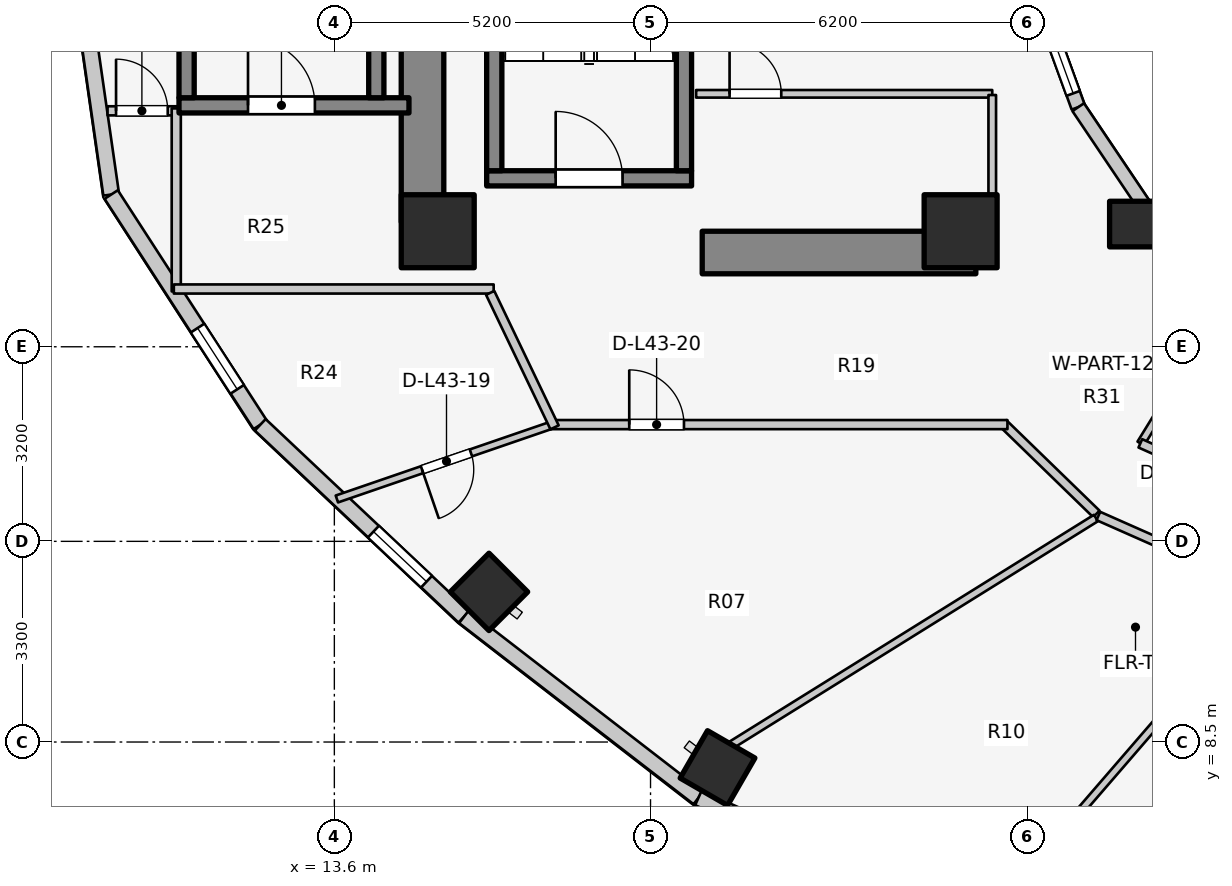
"""IFC4 building model, lengths in metres.
Left out: names, types, materials, properties, quantities, classifications, styles, units other than length and angle.
Written with IfcOpenShell. Run it as: python <this file> out.ifc"""

import sys

from ifc_helpers import new_model, si_unit, direction, frame, frame_2d, origin, origin_2d, place, context, subcontext, project, spatial, rectangle, extrude, element, fill, save


model = new_model("IFC4")
c1 = context("Model", 3, precision=1e-05, world=origin(), true_north=direction((0.0, 1.0)))
c2 = subcontext(c1, "Body", "Model", "MODEL_VIEW")
j1 = project(units=[si_unit("LENGTHUNIT", "METRE"), si_unit("PLANEANGLEUNIT", "RADIAN")], contexts=[c1])
p1 = place(None, origin())
s1 = spatial("IfcSite", under=j1, at=p1, CompositionType="ELEMENT")
p2 = place(p1, origin())
s2 = spatial("IfcBuilding", under=s1, at=p2, CompositionType="ELEMENT")
p3 = place(p2, frame((0.0, 0.0, 143.6)))
s3 = spatial("IfcBuildingStorey", under=s2, at=p3, CompositionType="ELEMENT", Elevation=143.6)
p4 = place(p3, frame((15.05, 17.05, 0.0), z_axis=(0.0, 0.0, 1.0), x_axis=(0.0, 1.0, 0.0)))
e1 = element("IfcWall", 1, at=p4, inside=s3, PredefinedType="SHEAR", context=c2, shape_type="SweptSolid", body=[
    extrude(rectangle(XDim=12.8, YDim=0.7, at=frame_2d((6.4, 0.0))), origin(), (0.0, 0.0, 1.0), 3.1),
])
p5 = place(p3, frame((19.65, 16.55, 0.0), z_axis=(0.0, 0.0, 1.0), x_axis=(1.0, 0.0, 0.0)))
e2 = element("IfcWall", 2, at=p5, inside=s3, PredefinedType="SHEAR", context=c2, shape_type="SweptSolid", body=[
    extrude(rectangle(XDim=4.5, YDim=0.7, at=frame_2d((2.25, 0.0))), origin(), (0.0, 0.0, 1.0), 3.1),
])
p6 = place(p3, frame((16.105, 17.77, 0.0), z_axis=(0.0, 0.0, 1.0), x_axis=(1.0, 0.0, 0.0)))
e3 = element("IfcWall", 3, at=p6, inside=s3, PredefinedType="SOLIDWALL", context=c2, shape_type="SweptSolid", body=[
    extrude(rectangle(XDim=3.37, YDim=0.25, at=frame_2d((1.685, 0.0))), origin(), (0.0, 0.0, 1.0), 3.1),
])
p7 = place(p6, frame((1.135, 0.0, 0.0)))
e4 = element("IfcOpeningElement", 4, at=p7, cuts=e3, PredefinedType="OPENING", context=c2, shape_type="SweptSolid", body=[
    extrude(rectangle(XDim=1.1, YDim=2.1, at=frame_2d((0.55, 1.05))), frame((0.0, 0.135, 0.0), z_axis=(0.0, -1.0, 0.0), x_axis=(1.0, 0.0, 0.0)), (0.0, 0.0, 1.0), 0.27),
])
for number, where, z_axis, x_axis in (
    (5, (16.23, 17.895, 0.0), (0.0, 0.0, 1.0), (0.0, 1.0, 0.0)),
    (6, (19.35, 17.895, 0.0), (0.0, 0.0, 1.0), (0.0, 1.0, 0.0)),
):
    element("IfcWall", number, at=place(p3, frame(where, z_axis=z_axis, x_axis=x_axis)), inside=s3, PredefinedType="SOLIDWALL", context=c2, shape_type="SweptSolid", body=[
        extrude(rectangle(XDim=7.81, YDim=0.25, at=frame_2d((3.905, 0.0))), origin(), (0.0, 0.0, 1.0), 3.1),
    ])
p8 = place(p3, frame((11.045, 18.97, 0.0), z_axis=(0.0, 0.0, 1.0), x_axis=(1.0, 0.0, 0.0)))
e7 = element("IfcWall", 7, at=p8, inside=s3, PredefinedType="SOLIDWALL", context=c2, shape_type="SweptSolid", body=[
    extrude(rectangle(XDim=3.782, YDim=0.25, at=frame_2d((1.891, 0.0))), origin(), (0.0, 0.0, 1.0), 3.1),
])
p9 = place(p8, frame((1.135, 0.0, 0.0)))
e8 = element("IfcOpeningElement", 8, at=p9, cuts=e7, PredefinedType="OPENING", context=c2, shape_type="SweptSolid", body=[
    extrude(rectangle(XDim=1.1, YDim=2.1, at=frame_2d((0.55, 1.05))), frame((0.0, 0.135, 0.0), z_axis=(0.0, -1.0, 0.0), x_axis=(1.0, 0.0, 0.0)), (0.0, 0.0, 1.0), 0.27),
])
for number, where, z_axis, x_axis in (
    (9, (11.17, 19.095, 0.0), (0.0, 0.0, 1.0), (0.0, 1.0, 0.0)),
    (10, (14.29, 19.095, 0.0), (0.0, 0.0, 1.0), (0.0, 1.0, 0.0)),
):
    element("IfcWall", number, at=place(p3, frame(where, z_axis=z_axis, x_axis=x_axis)), inside=s3, PredefinedType="SOLIDWALL", context=c2, shape_type="SweptSolid", body=[
        extrude(rectangle(XDim=7.81, YDim=0.25, at=frame_2d((3.905, 0.0))), origin(), (0.0, 0.0, 1.0), 3.1),
    ])
for number, where, z_axis, x_axis in (
    (11, (15.3, 16.9, 0.0), (0.0, 0.0, 1.0), (1.0, 0.0, 0.0)),
    (12, (23.9, 16.9, 0.0), (0.0, 0.0, 1.0), (1.0, 0.0, 0.0)),
):
    element("IfcColumn", number, at=place(p3, frame(where, z_axis=z_axis, x_axis=x_axis)), inside=s3, PredefinedType="COLUMN", context=c2, shape_type="SweptSolid", body=[
        extrude(rectangle(XDim=1.2, YDim=1.2, at=origin_2d()), origin(), (0.0, 0.0, 1.0), 3.1),
    ])
p10 = place(p3, frame((26.725, 17.018, 0.0), z_axis=(0.0, 0.0, 1.0), x_axis=(1.0, 0.0, 0.0)))
e13 = element("IfcColumn", 13, at=p10, inside=s3, PredefinedType="COLUMN", context=c2, shape_type="SweptSolid", body=[
    extrude(rectangle(XDim=0.75, YDim=0.75, at=origin_2d()), origin(), (0.0, 0.0, 1.0), 3.1),
])
for number, where, z_axis, x_axis in (
    (14, (16.143, 10.969, 0.0), (0.0, 0.0, 1.0), (-0.707, -0.707, 0.0)),
    (15, (19.902, 8.072, 0.0), (0.0, 0.0, 1.0), (-0.5, -0.866, 0.0)),
):
    element("IfcColumn", number, at=place(p3, frame(where, z_axis=z_axis, x_axis=x_axis)), inside=s3, PredefinedType="COLUMN", context=c2, shape_type="SweptSolid", body=[
        extrude(rectangle(XDim=0.9, YDim=0.9, at=origin_2d()), origin(), (0.0, 0.0, 1.0), 3.1),
    ])
p11 = place(p3, frame((25.123, 20.898, 0.0), z_axis=(0.0, 0.0, 1.0), x_axis=(0.341423187295, -0.93990968033, 0.0)))
e16 = element("IfcWall", 16, at=p11, inside=s3, PredefinedType="STANDARD", context=c2, shape_type="SweptSolid", body=[
    extrude(rectangle(XDim=2.084, YDim=0.23, at=frame_2d((1.042, 0.0))), origin(), (0.0, 0.0, 1.0), 2.84),
])
p12 = place(p11, frame((0.242, 0.0, 0.85)))
e17 = element("IfcOpeningElement", 17, at=p12, cuts=e16, PredefinedType="OPENING", context=c2, shape_type="SweptSolid", body=[
    extrude(rectangle(XDim=1.6, YDim=1.65, at=frame_2d((0.8, 0.825))), frame((0.0, 0.125, 0.0), z_axis=(0.0, -1.0, 0.0), x_axis=(1.0, 0.0, 0.0)), (0.0, 0.0, 1.0), 0.25),
])
p13 = place(p3, frame((25.834, 18.94, 0.0), z_axis=(0.0, 0.0, 1.0), x_axis=(0.558197800898, -0.829707909492, 0.0)))
e18 = element("IfcWall", 18, at=p13, inside=s3, PredefinedType="STANDARD", context=c2, shape_type="SweptSolid", body=[
    extrude(rectangle(XDim=2.027, YDim=0.23, at=frame_2d((1.013, 0.0))), origin(), (0.0, 0.0, 1.0), 2.16),
])
p14 = place(p3, frame((26.965, 17.258, 0.0), z_axis=(0.0, 0.0, 1.0), x_axis=(0.752576694707, -0.658504607869, 0.0)))
e19 = element("IfcWall", 19, at=p14, inside=s3, PredefinedType="STANDARD", context=c2, shape_type="SweptSolid", body=[
    extrude(rectangle(XDim=1.959, YDim=0.23, at=frame_2d((0.98, 0.0))), origin(), (0.0, 0.0, 1.0), 2.16),
])
p15 = place(p3, frame((9.14, 23.0, 0.0), z_axis=(0.0, 0.0, 1.0), x_axis=(0.142227632286, -0.989833976288, 0.0)))
e20 = element("IfcWall", 20, at=p15, inside=s3, PredefinedType="STANDARD", context=c2, shape_type="SweptSolid", body=[
    extrude(rectangle(XDim=5.553, YDim=0.26, at=frame_2d((2.776, 0.0))), origin(), (0.0, 0.0, 1.0), 2.85),
])
p16 = place(p15, frame((1.506, 0.0, 0.75)))
e21 = element("IfcOpeningElement", 21, at=p16, cuts=e20, PredefinedType="OPENING", context=c2, shape_type="SweptSolid", body=[
    extrude(rectangle(XDim=1.2, YDim=1.5, at=frame_2d((0.6, 0.75))), frame((0.0, 0.14, 0.0), z_axis=(0.0, -1.0, 0.0), x_axis=(1.0, 0.0, 0.0)), (0.0, 0.0, 1.0), 0.28),
])
p17 = place(p3, frame((9.93, 17.503, 0.0), z_axis=(0.0, 0.0, 1.0), x_axis=(0.543358984534, -0.839500454989, 0.0)))
e22 = element("IfcWall", 22, at=p17, inside=s3, PredefinedType="STANDARD", context=c2, shape_type="SweptSolid", body=[
    extrude(rectangle(XDim=4.511, YDim=0.26, at=frame_2d((2.256, 0.0))), origin(), (0.0, 0.0, 1.0), 2.85),
])
p18 = place(p17, frame((2.615, 0.0, 0.75)))
e23 = element("IfcOpeningElement", 23, at=p18, cuts=e22, PredefinedType="OPENING", context=c2, shape_type="SweptSolid", body=[
    extrude(rectangle(XDim=1.2, YDim=1.5, at=frame_2d((0.6, 0.75))), frame((0.0, 0.14, 0.0), z_axis=(0.0, -1.0, 0.0), x_axis=(1.0, 0.0, 0.0)), (0.0, 0.0, 1.0), 0.28),
])
p19 = place(p3, frame((12.381, 13.716, 0.0), z_axis=(0.0, 0.0, 1.0), x_axis=(0.727667301037, -0.68593024354, 0.0)))
e24 = element("IfcWall", 24, at=p19, inside=s3, PredefinedType="STANDARD", context=c2, shape_type="SweptSolid", body=[
    extrude(rectangle(XDim=4.604, YDim=0.26, at=frame_2d((2.302, 0.0))), origin(), (0.0, 0.0, 1.0), 2.85),
])
p20 = place(p19, frame((2.56, 0.0, 0.75)))
e25 = element("IfcOpeningElement", 25, at=p20, cuts=e24, PredefinedType="OPENING", context=c2, shape_type="SweptSolid", body=[
    extrude(rectangle(XDim=1.2, YDim=1.5, at=frame_2d((0.6, 0.75))), frame((0.0, 0.14, 0.0), z_axis=(0.0, -1.0, 0.0), x_axis=(1.0, 0.0, 0.0)), (0.0, 0.0, 1.0), 0.28),
])
p21 = place(p3, frame((15.731, 10.559, 0.0), z_axis=(0.0, 0.0, 1.0), x_axis=(0.791460185804, -0.611220724687, 0.0)))
e26 = element("IfcWall", 26, at=p21, inside=s3, PredefinedType="STANDARD", context=c2, shape_type="SweptSolid", body=[
    extrude(rectangle(XDim=4.872, YDim=0.26, at=frame_2d((2.436, 0.0))), origin(), (0.0, 0.0, 1.0), 2.85),
])
p22 = place(p3, frame((19.587, 7.581, 0.0), z_axis=(0.0, 0.0, 1.0), x_axis=(0.912353637112, -0.409403029847, 0.0)))
e27 = element("IfcWall", 27, at=p22, inside=s3, PredefinedType="STANDARD", context=c2, shape_type="SweptSolid", body=[
    extrude(rectangle(XDim=5.533, YDim=0.26, at=frame_2d((2.766, 0.0))), origin(), (0.0, 0.0, 1.0), 2.85),
])
p23 = place(p22, frame((2.016, 0.0, 0.75)))
e28 = element("IfcOpeningElement", 28, at=p23, cuts=e27, PredefinedType="OPENING", context=c2, shape_type="SweptSolid", body=[
    extrude(rectangle(XDim=1.5, YDim=1.6, at=frame_2d((0.75, 0.8))), frame((0.0, 0.14, 0.0), z_axis=(0.0, -1.0, 0.0), x_axis=(1.0, 0.0, 0.0)), (0.0, 0.0, 1.0), 0.28),
])
p24 = place(p3, frame((19.55, 19.16, 0.0), z_axis=(0.0, 0.0, 1.0), x_axis=(1.0, 0.0, 0.0)))
e29 = element("IfcWall", 29, at=p24, inside=s3, PredefinedType="PARTITIONING", context=c2, shape_type="SweptSolid", body=[
    extrude(rectangle(XDim=4.87, YDim=0.125, at=frame_2d((2.435, 0.0))), origin(), (0.0, 0.0, 1.0), 2.12),
])
p25 = place(p24, frame((0.55, 0.0, 0.0)))
e30 = element("IfcOpeningElement", 30, at=p25, cuts=e29, PredefinedType="OPENING", context=c2, shape_type="SweptSolid", body=[
    extrude(rectangle(XDim=0.85, YDim=2.05, at=frame_2d((0.425, 1.025))), frame((0.0, 0.073, 0.0), z_axis=(0.0, -1.0, 0.0), x_axis=(1.0, 0.0, 0.0)), (0.0, 0.0, 1.0), 0.145),
])
p26 = place(p3, frame((24.42, 17.1, 0.0), z_axis=(0.0, 0.0, 1.0), x_axis=(0.0, 1.0, 0.0)))
e31 = element("IfcWall", 31, at=p26, inside=s3, PredefinedType="PARTITIONING", context=c2, shape_type="SweptSolid", body=[
    extrude(rectangle(XDim=2.04, YDim=0.125, at=frame_2d((1.02, 0.0))), origin(), (0.0, 0.0, 1.0), 2.232),
])
p27 = place(p3, frame((9.87, 18.88, 0.0), z_axis=(0.0, 0.0, 1.0), x_axis=(1.0, 0.0, 0.0)))
e32 = element("IfcWall", 32, at=p27, inside=s3, PredefinedType="PARTITIONING", context=c2, shape_type="SweptSolid", body=[
    extrude(rectangle(XDim=1.17, YDim=0.15, at=frame_2d((0.585, 0.0))), origin(), (0.0, 0.0, 1.0), 2.855),
])
p28 = place(p27, frame((0.14, 0.0, 0.0)))
e33 = element("IfcOpeningElement", 33, at=p28, cuts=e32, PredefinedType="OPENING", context=c2, shape_type="SweptSolid", body=[
    extrude(rectangle(XDim=0.85, YDim=2.05, at=frame_2d((0.425, 1.025))), frame((0.0, 0.085, 0.0), z_axis=(0.0, -1.0, 0.0), x_axis=(1.0, 0.0, 0.0)), (0.0, 0.0, 1.0), 0.17),
])
p29 = place(p3, frame((11.0, 15.91, 0.0), z_axis=(0.0, 0.0, 1.0), x_axis=(0.0, 1.0, 0.0)))
e34 = element("IfcWall", 34, at=p29, inside=s3, PredefinedType="PARTITIONING", context=c2, shape_type="SweptSolid", body=[
    extrude(rectangle(XDim=3.01, YDim=0.15, at=frame_2d((1.505, 0.0))), origin(), (0.0, 0.0, 1.0), 2.855),
])
p30 = place(p3, frame((10.96, 15.95, 0.0), z_axis=(0.0, 0.0, 1.0), x_axis=(1.0, 0.0, 0.0)))
e35 = element("IfcWall", 35, at=p30, inside=s3, PredefinedType="PARTITIONING", context=c2, shape_type="SweptSolid", body=[
    extrude(rectangle(XDim=5.26, YDim=0.15, at=frame_2d((2.63, 0.0))), origin(), (0.0, 0.0, 1.0), 2.22),
])
p31 = place(p3, frame((17.247, 13.736, 0.0), z_axis=(0.0, 0.0, 1.0), x_axis=(-0.945683523506, -0.325088716151, 0.0)))
e36 = element("IfcWall", 36, at=p31, inside=s3, PredefinedType="MOVABLE", context=c2, shape_type="SweptSolid", body=[
    extrude(rectangle(XDim=3.813, YDim=0.12, at=frame_2d((1.906, 0.0))), origin(), (0.0, 0.0, 1.0), 2.22),
])
p32 = place(p31, frame((1.481, 0.0, 0.0)))
e37 = element("IfcOpeningElement", 37, at=p32, cuts=e36, PredefinedType="OPENING", context=c2, shape_type="SweptSolid", body=[
    extrude(rectangle(XDim=0.85, YDim=2.05, at=frame_2d((0.425, 1.025))), frame((0.0, 0.07, 0.0), z_axis=(0.0, -1.0, 0.0), x_axis=(1.0, 0.0, 0.0)), (0.0, 0.0, 1.0), 0.14),
])
p33 = place(p3, frame((26.133, 12.251, 0.0), z_axis=(0.0, 0.0, 1.0), x_axis=(-0.717419568599, 0.696641344302, 0.0)))
e38 = element("IfcWall", 38, at=p33, inside=s3, PredefinedType="PARTITIONING", context=c2, shape_type="SweptSolid", body=[
    extrude(rectangle(XDim=2.138, YDim=0.15, at=frame_2d((1.069, 0.0))), origin(), (0.0, 0.0, 1.0), 2.299),
])
p34 = place(p3, frame((17.15, 13.72, 0.0), z_axis=(0.0, 0.0, 1.0), x_axis=(1.0, 0.0, 0.0)))
e39 = element("IfcWall", 39, at=p34, inside=s3, PredefinedType="PARTITIONING", context=c2, shape_type="SweptSolid", body=[
    extrude(rectangle(XDim=7.52, YDim=0.15, at=frame_2d((3.76, 0.0))), origin(), (0.0, 0.0, 1.0), 2.299),
])
p35 = place(p34, frame((1.3, 0.0, 0.0)))
e40 = element("IfcOpeningElement", 40, at=p35, cuts=e39, PredefinedType="OPENING", context=c2, shape_type="SweptSolid", body=[
    extrude(rectangle(XDim=0.9, YDim=2.1, at=frame_2d((0.45, 1.05))), frame((0.0, 0.085, 0.0), z_axis=(0.0, -1.0, 0.0), x_axis=(1.0, 0.0, 0.0)), (0.0, 0.0, 1.0), 0.17),
])
p36 = place(p3, frame((17.222, 13.675, 0.0), z_axis=(0.0, 0.0, 1.0), x_axis=(-0.431973389813, 0.901886351207, 0.0)))
e41 = element("IfcWall", 41, at=p36, inside=s3, PredefinedType="PARTITIONING", context=c2, shape_type="SweptSolid", body=[
    extrude(rectangle(XDim=2.452, YDim=0.15, at=frame_2d((1.226, 0.0))), origin(), (0.0, 0.0, 1.0), 2.855),
])
p37 = place(p3, frame((28.45, 15.985, 0.0), z_axis=(0.0, 0.0, 1.0), x_axis=(-0.524565340045, -0.851370192116, 0.0)))
e42 = element("IfcWall", 42, at=p37, inside=s3, PredefinedType="PARTITIONING", context=c2, shape_type="SweptSolid", body=[
    extrude(rectangle(XDim=3.027, YDim=0.125, at=frame_2d((1.514, 0.0))), origin(), (0.0, 0.0, 1.0), 2.299),
])
p38 = place(p3, frame((26.856, 13.412, 0.0), z_axis=(0.0, 0.0, 1.0), x_axis=(0.912985265053, -0.407992531545, 0.0)))
e43 = element("IfcWall", 43, at=p38, inside=s3, PredefinedType="PARTITIONING", context=c2, shape_type="SweptSolid", body=[
    extrude(rectangle(XDim=2.723, YDim=0.15, at=frame_2d((1.362, 0.0))), origin(), (0.0, 0.0, 1.0), 2.299),
])
p39 = place(p3, frame((26.125, 12.184, 0.0), z_axis=(0.0, 0.0, 1.0), x_axis=(-0.849008457073, -0.528379257559, 0.0)))
e44 = element("IfcWall", 44, at=p39, inside=s3, PredefinedType="PARTITIONING", context=c2, shape_type="SweptSolid", body=[
    extrude(rectangle(XDim=7.077, YDim=0.125, at=frame_2d((3.539, 0.0))), origin(), (0.0, 0.0, 1.0), 2.299),
])
p40 = place(p3, frame((28.947, 10.927, 0.0), z_axis=(0.0, 0.0, 1.0), x_axis=(-0.653779283332, -0.756685303601, 0.0)))
e45 = element("IfcWall", 45, at=p40, inside=s3, PredefinedType="PARTITIONING", context=c2, shape_type="SweptSolid", body=[
    extrude(rectangle(XDim=6.14, YDim=0.125, at=frame_2d((3.07, 0.0))), origin(), (0.0, 0.0, 1.0), 2.299),
])
p41 = place(p3, frame((26.165, 12.217, 0.0), z_axis=(0.0, 0.0, 1.0), x_axis=(0.91445214467, -0.404694051239, 0.0)))
e46 = element("IfcWall", 46, at=p41, inside=s3, PredefinedType="PARTITIONING", context=c2, shape_type="SweptSolid", body=[
    extrude(rectangle(XDim=3.091, YDim=0.15, at=frame_2d((1.545, 0.0))), origin(), (0.0, 0.0, 1.0), 2.299),
])
p42 = place(p41, frame((1.045, 0.0, 0.0)))
e47 = element("IfcOpeningElement", 47, at=p42, cuts=e46, PredefinedType="OPENING", context=c2, shape_type="SweptSolid", body=[
    extrude(rectangle(XDim=1.0, YDim=2.1, at=frame_2d((0.5, 1.05))), frame((0.0, 0.085, 0.0), z_axis=(0.0, -1.0, 0.0), x_axis=(1.0, 0.0, 0.0)), (0.0, 0.0, 1.0), 0.17),
])
p43 = place(p12, origin())
e48 = element("IfcWindow", 48, at=p43, inside=s3, PartitioningType="SINGLE_PANEL", PredefinedType="WINDOW", context=c2, shape_type="SweptSolid", body=[
    extrude(rectangle(XDim=1.6, YDim=1.65, at=frame_2d((0.8, 0.825))), frame((0.0, 0.03, 0.0), z_axis=(0.0, -1.0, 0.0), x_axis=(1.0, 0.0, 0.0)), (0.0, 0.0, 1.0), 0.06),
])
fill(e17, e48)
p44 = place(p18, origin())
e49 = element("IfcWindow", 49, at=p44, inside=s3, PartitioningType="SINGLE_PANEL", PredefinedType="WINDOW", context=c2, shape_type="SweptSolid", body=[
    extrude(rectangle(XDim=1.2, YDim=1.5, at=frame_2d((0.6, 0.75))), frame((0.0, 0.03, 0.0), z_axis=(0.0, -1.0, 0.0), x_axis=(1.0, 0.0, 0.0)), (0.0, 0.0, 1.0), 0.06),
])
fill(e23, e49)
p45 = place(p20, origin())
e50 = element("IfcWindow", 50, at=p45, inside=s3, PartitioningType="SINGLE_PANEL", PredefinedType="WINDOW", context=c2, shape_type="SweptSolid", body=[
    extrude(rectangle(XDim=1.2, YDim=1.5, at=frame_2d((0.6, 0.75))), frame((0.0, 0.03, 0.0), z_axis=(0.0, -1.0, 0.0), x_axis=(1.0, 0.0, 0.0)), (0.0, 0.0, 1.0), 0.06),
])
fill(e25, e50)
p46 = place(p7, origin())
e51 = element("IfcDoor", 51, at=p46, inside=s3, OperationType="SINGLE_SWING_LEFT", PredefinedType="DOOR", context=c2, shape_type="SweptSolid", body=[
    extrude(rectangle(XDim=1.1, YDim=2.1, at=frame_2d((0.55, 1.05))), frame((0.0, 0.025, 0.0), z_axis=(0.0, -1.0, 0.0), x_axis=(1.0, 0.0, 0.0)), (0.0, 0.0, 1.0), 0.05),
])
fill(e4, e51)
p47 = place(p9, origin())
e52 = element("IfcDoor", 52, at=p47, inside=s3, OperationType="SINGLE_SWING_LEFT", PredefinedType="DOOR", context=c2, shape_type="SweptSolid", body=[
    extrude(rectangle(XDim=1.1, YDim=2.1, at=frame_2d((0.55, 1.05))), frame((0.0, 0.025, 0.0), z_axis=(0.0, -1.0, 0.0), x_axis=(1.0, 0.0, 0.0)), (0.0, 0.0, 1.0), 0.05),
])
fill(e8, e52)
p48 = place(p25, origin())
e53 = element("IfcDoor", 53, at=p48, inside=s3, OperationType="SINGLE_SWING_LEFT", PredefinedType="DOOR", context=c2, shape_type="SweptSolid", body=[
    extrude(rectangle(XDim=0.85, YDim=2.05, at=frame_2d((0.425, 1.025))), frame((0.0, 0.025, 0.0), z_axis=(0.0, -1.0, 0.0), x_axis=(1.0, 0.0, 0.0)), (0.0, 0.0, 1.0), 0.05),
])
fill(e30, e53)
p49 = place(p28, origin())
e54 = element("IfcDoor", 54, at=p49, inside=s3, OperationType="SINGLE_SWING_LEFT", PredefinedType="DOOR", context=c2, shape_type="SweptSolid", body=[
    extrude(rectangle(XDim=0.85, YDim=2.05, at=frame_2d((0.425, 1.025))), frame((0.0, 0.025, 0.0), z_axis=(0.0, -1.0, 0.0), x_axis=(1.0, 0.0, 0.0)), (0.0, 0.0, 1.0), 0.05),
])
fill(e33, e54)
p50 = place(p32, origin())
e55 = element("IfcDoor", 55, at=p50, inside=s3, OperationType="SINGLE_SWING_RIGHT", PredefinedType="DOOR", context=c2, shape_type="SweptSolid", body=[
    extrude(rectangle(XDim=0.85, YDim=2.05, at=frame_2d((0.425, 1.025))), frame((0.0, 0.025, 0.0), z_axis=(0.0, -1.0, 0.0), x_axis=(1.0, 0.0, 0.0)), (0.0, 0.0, 1.0), 0.05),
])
fill(e37, e55)
p51 = place(p35, origin())
e56 = element("IfcDoor", 56, at=p51, inside=s3, OperationType="SINGLE_SWING_LEFT", PredefinedType="DOOR", context=c2, shape_type="SweptSolid", body=[
    extrude(rectangle(XDim=0.9, YDim=2.1, at=frame_2d((0.45, 1.05))), frame((0.0, 0.025, 0.0), z_axis=(0.0, -1.0, 0.0), x_axis=(1.0, 0.0, 0.0)), (0.0, 0.0, 1.0), 0.05),
])
fill(e40, e56)
save(model, sys.argv[1])
